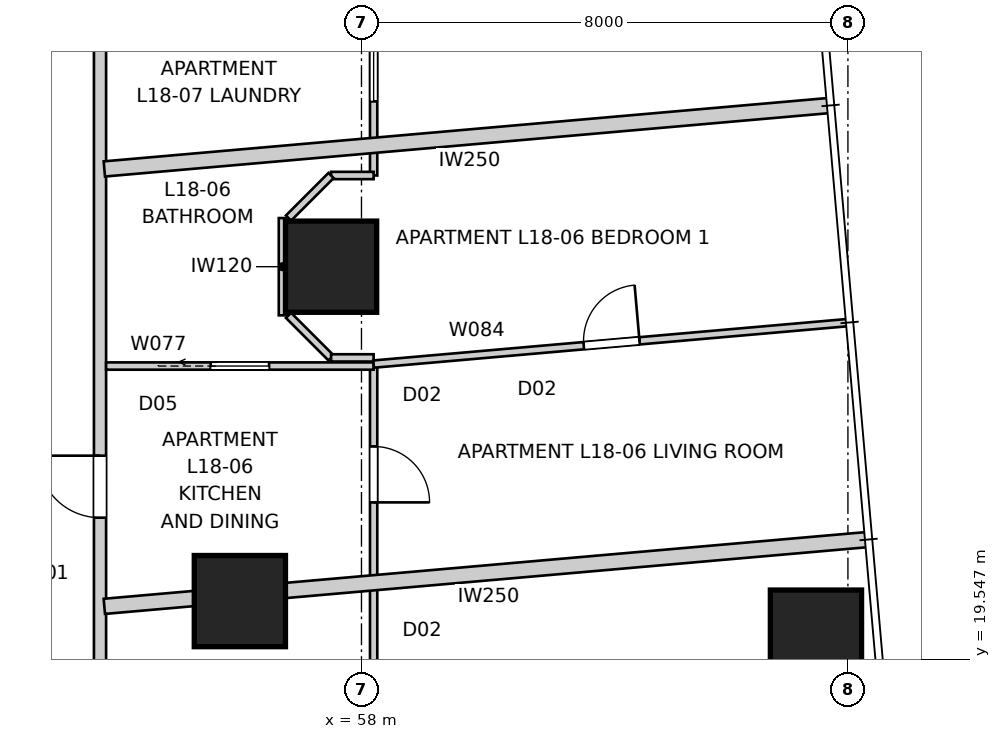
"""IFC4 building model, lengths in metres.
Left out: names, types, materials, properties, quantities, classifications, styles, units other than length and angle.
Written with IfcOpenShell. Run it as: python <this file> out.ifc"""

import sys

from ifc_helpers import new_model, si_unit, direction, frame, frame_2d, origin, origin_2d, place, context, subcontext, project, spatial, rectangle, extrude, element, fill, save


model = new_model("IFC4")
c1 = context("Model", 3, precision=1e-05, world=origin(), true_north=direction((0.0, 1.0)))
c2 = subcontext(c1, "Body", "Model", "MODEL_VIEW")
j1 = project(units=[si_unit("LENGTHUNIT", "METRE"), si_unit("PLANEANGLEUNIT", "RADIAN")], contexts=[c1])
p1 = place(None, origin())
s1 = spatial("IfcSite", under=j1, at=p1, CompositionType="ELEMENT")
p2 = place(p1, origin())
s2 = spatial("IfcBuilding", under=s1, at=p2, CompositionType="ELEMENT")
p3 = place(p2, frame((0.0, 0.0, 67.6)))
s3 = spatial("IfcBuildingStorey", under=s2, at=p3, CompositionType="ELEMENT", Elevation=67.6)
for number, where, z_axis, x_axis in (
    (1, (65.474, 19.932, 0.0), (0.0, 0.0, 1.0), (1.0, 0.0, 0.0)),
    (2, (57.5, 26.0, 0.0), (0.0, 0.0, 1.0), (1.0, 0.0, 0.0)),
    (3, (56.0, 20.5, 0.0), (0.0, 0.0, 1.0), (1.0, 0.0, 0.0)),
):
    element("IfcColumn", number, at=place(p3, frame(where, z_axis=z_axis, x_axis=x_axis)), inside=s3, PredefinedType="COLUMN", context=c2, shape_type="SweptSolid", body=[
        extrude(rectangle(XDim=1.5, YDim=1.5, at=origin_2d()), origin(), (0.0, 0.0, 1.0), 3.4),
    ])
p4 = place(p3, frame((53.7, 16.3, 0.0), z_axis=(0.0, 0.0, 1.0), x_axis=(0.0, 1.0, 0.0)))
e4 = element("IfcWall", 4, at=p4, inside=s3, PredefinedType="PARTITIONING", context=c2, shape_type="SweptSolid", body=[
    extrude(rectangle(XDim=28.2, YDim=0.2, at=frame_2d((14.1, 0.0))), origin(), (0.0, 0.0, 1.0), 3.25),
])
p5 = place(p4, frame((15.716, 0.0, 0.0)))
e5 = element("IfcOpeningElement", 5, at=p5, cuts=e4, PredefinedType="OPENING", context=c2, shape_type="SweptSolid", body=[
    extrude(rectangle(XDim=1.02, YDim=2.34, at=frame_2d((0.51, 1.17))), frame((0.0, 0.11, 0.0), z_axis=(0.0, -1.0, 0.0), x_axis=(1.0, 0.0, 0.0)), (0.0, 0.0, 1.0), 0.22),
])
p6 = place(p4, frame((5.572, 0.0, 0.0)))
e6 = element("IfcOpeningElement", 6, at=p6, cuts=e4, PredefinedType="OPENING", context=c2, shape_type="SweptSolid", body=[
    extrude(rectangle(XDim=1.02, YDim=2.34, at=frame_2d((0.51, 1.17))), frame((0.0, 0.11, 0.0), z_axis=(0.0, -1.0, 0.0), x_axis=(1.0, 0.0, 0.0)), (0.0, 0.0, 1.0), 0.22),
])
p7 = place(p4, frame((1.715, 0.0, 0.0)))
e7 = element("IfcOpeningElement", 7, at=p7, cuts=e4, PredefinedType="OPENING", context=c2, shape_type="SweptSolid", body=[
    extrude(rectangle(XDim=1.02, YDim=2.1, at=frame_2d((0.51, 1.05))), frame((0.0, 0.11, 0.0), z_axis=(0.0, -1.0, 0.0), x_axis=(1.0, 0.0, 0.0)), (0.0, 0.0, 1.0), 0.22),
])
p8 = place(p3, frame((65.715, 28.653, 0.0), z_axis=(0.0, 0.0, 1.0), x_axis=(-0.996195220272, -0.087149773992, 0.0)))
e8 = element("IfcWall", 8, at=p8, inside=s3, PredefinedType="PARTITIONING", context=c2, shape_type="SweptSolid", body=[
    extrude(rectangle(XDim=11.99, YDim=0.25, at=frame_2d((5.995, 0.0))), origin(), (0.0, 0.0, 1.0), 3.25),
])
p9 = place(p3, frame((66.34, 21.513, 0.0), z_axis=(0.0, 0.0, 1.0), x_axis=(-0.996194851608, -0.087153988028, 0.0)))
e9 = element("IfcWall", 9, at=p9, inside=s3, PredefinedType="PARTITIONING", context=c2, shape_type="SweptSolid", body=[
    extrude(rectangle(XDim=12.617, YDim=0.25, at=frame_2d((6.309, 0.0))), origin(), (0.0, 0.0, 1.0), 3.25),
])
p10 = place(p3, frame((58.2, 24.366, 0.0), z_axis=(0.0, 0.0, 1.0), x_axis=(0.0, -1.0, 0.0)))
e10 = element("IfcWall", 10, at=p10, inside=s3, PredefinedType="PARTITIONING", context=c2, shape_type="SweptSolid", body=[
    extrude(rectangle(XDim=12.566, YDim=0.12, at=frame_2d((6.283, 0.0))), origin(), (0.0, 0.0, 1.0), 3.25),
])
p11 = place(p10, frame((1.322, 0.0, 0.0)))
e11 = element("IfcOpeningElement", 11, at=p11, cuts=e10, PredefinedType="OPENING", context=c2, shape_type="SweptSolid", body=[
    extrude(rectangle(XDim=0.92, YDim=2.34, at=frame_2d((0.46, 1.17))), frame((0.0, 0.07, 0.0), z_axis=(0.0, -1.0, 0.0), x_axis=(1.0, 0.0, 0.0)), (0.0, 0.0, 1.0), 0.14),
])
p12 = place(p10, frame((5.188, 0.0, 0.0)))
e12 = element("IfcOpeningElement", 12, at=p12, cuts=e10, PredefinedType="OPENING", context=c2, shape_type="SweptSolid", body=[
    extrude(rectangle(XDim=0.92, YDim=2.34, at=frame_2d((0.46, 1.17))), frame((0.0, 0.07, 0.0), z_axis=(0.0, -1.0, 0.0), x_axis=(1.0, 0.0, 0.0)), (0.0, 0.0, 1.0), 0.14),
])
p13 = place(p3, frame((53.8, 24.366, 0.0), z_axis=(0.0, 0.0, 1.0), x_axis=(1.0, 0.0, 0.0)))
e13 = element("IfcWall", 13, at=p13, inside=s3, PredefinedType="PARTITIONING", context=c2, shape_type="SweptSolid", body=[
    extrude(rectangle(XDim=4.4, YDim=0.12, at=frame_2d((2.2, 0.0))), origin(), (0.0, 0.0, 1.0), 3.25),
])
p14 = place(p13, frame((1.72, 0.0, 0.0)))
e14 = element("IfcOpeningElement", 14, at=p14, cuts=e13, PredefinedType="OPENING", context=c2, shape_type="SweptSolid", body=[
    extrude(rectangle(XDim=0.96, YDim=2.1, at=frame_2d((0.48, 1.05))), frame((0.0, 0.07, 0.0), z_axis=(0.0, -1.0, 0.0), x_axis=(1.0, 0.0, 0.0)), (0.0, 0.0, 1.0), 0.14),
])
p15 = place(p3, frame((58.2, 48.2, 0.0), z_axis=(0.0, 0.0, 1.0), x_axis=(0.0, -1.0, 0.0)))
e15 = element("IfcWall", 15, at=p15, inside=s3, PredefinedType="PARTITIONING", context=c2, shape_type="SweptSolid", body=[
    extrude(rectangle(XDim=20.7, YDim=0.12, at=frame_2d((10.35, 0.0))), origin(), (0.0, 0.0, 1.0), 3.25),
])
p16 = place(p15, frame((15.095, 0.0, 0.0)))
e16 = element("IfcOpeningElement", 16, at=p16, cuts=e15, PredefinedType="OPENING", context=c2, shape_type="SweptSolid", body=[
    extrude(rectangle(XDim=0.92, YDim=2.34, at=frame_2d((0.46, 1.17))), frame((0.0, 0.07, 0.0), z_axis=(0.0, -1.0, 0.0), x_axis=(1.0, 0.0, 0.0)), (0.0, 0.0, 1.0), 0.14),
])
p17 = place(p15, frame((18.521, 0.0, 0.0)))
e17 = element("IfcOpeningElement", 17, at=p17, cuts=e15, PredefinedType="OPENING", context=c2, shape_type="SweptSolid", body=[
    extrude(rectangle(XDim=0.96, YDim=2.1, at=frame_2d((0.48, 1.05))), frame((0.0, 0.07, 0.0), z_axis=(0.0, -1.0, 0.0), x_axis=(1.0, 0.0, 0.0)), (0.0, 0.0, 1.0), 0.14),
])
p18 = place(p15, frame((0.675, 0.0, 0.0)))
e18 = element("IfcOpeningElement", 18, at=p18, cuts=e15, PredefinedType="OPENING", context=c2, shape_type="SweptSolid", body=[
    extrude(rectangle(XDim=0.92, YDim=2.34, at=frame_2d((0.46, 1.17))), frame((0.0, 0.07, 0.0), z_axis=(0.0, -1.0, 0.0), x_axis=(1.0, 0.0, 0.0)), (0.0, 0.0, 1.0), 0.14),
])
p19 = place(p15, frame((3.872, 0.0, 0.0)))
e19 = element("IfcOpeningElement", 19, at=p19, cuts=e15, PredefinedType="OPENING", context=c2, shape_type="SweptSolid", body=[
    extrude(rectangle(XDim=0.96, YDim=2.1, at=frame_2d((0.48, 1.05))), frame((0.0, 0.07, 0.0), z_axis=(0.0, -1.0, 0.0), x_axis=(1.0, 0.0, 0.0)), (0.0, 0.0, 1.0), 0.14),
])
p20 = place(p3, frame((58.2, 27.5, 0.0), z_axis=(0.0, 0.0, 1.0), x_axis=(-1.0, 0.0, 0.0)))
e20 = element("IfcWall", 20, at=p20, inside=s3, PredefinedType="PARTITIONING", context=c2, shape_type="SweptSolid", body=[
    extrude(rectangle(XDim=0.7, YDim=0.12, at=frame_2d((0.35, 0.0))), origin(), (0.0, 0.0, 1.0), 3.25),
])
p21 = place(p3, frame((57.5, 27.5, 0.0), z_axis=(0.0, 0.0, 1.0), x_axis=(-0.707106781187, -0.707106781187, 0.0)))
e21 = element("IfcWall", 21, at=p21, inside=s3, PredefinedType="PARTITIONING", context=c2, shape_type="SweptSolid", body=[
    extrude(rectangle(XDim=0.99, YDim=0.12, at=frame_2d((0.495, 0.0))), origin(), (0.0, 0.0, 1.0), 3.25),
])
p22 = place(p3, frame((56.7, 26.8, 0.0), z_axis=(0.0, 0.0, 1.0), x_axis=(0.0, -1.0, 0.0)))
e22 = element("IfcWall", 22, at=p22, inside=s3, PredefinedType="PARTITIONING", context=c2, shape_type="SweptSolid", body=[
    extrude(rectangle(XDim=1.6, YDim=0.12, at=frame_2d((0.8, 0.0))), origin(), (0.0, 0.0, 1.0), 3.25),
])
p23 = place(p3, frame((56.8, 25.2, 0.0), z_axis=(0.0, 0.0, 1.0), x_axis=(0.707106781187, -0.707106781187, 0.0)))
e23 = element("IfcWall", 23, at=p23, inside=s3, PredefinedType="PARTITIONING", context=c2, shape_type="SweptSolid", body=[
    extrude(rectangle(XDim=0.99, YDim=0.12, at=frame_2d((0.495, 0.0))), origin(), (0.0, 0.0, 1.0), 3.25),
])
p24 = place(p3, frame((57.5, 24.5, 0.0), z_axis=(0.0, 0.0, 1.0), x_axis=(1.0, 0.0, 0.0)))
e24 = element("IfcWall", 24, at=p24, inside=s3, PredefinedType="PARTITIONING", context=c2, shape_type="SweptSolid", body=[
    extrude(rectangle(XDim=0.7, YDim=0.12, at=frame_2d((0.35, 0.0))), origin(), (0.0, 0.0, 1.0), 3.25),
])
p25 = place(p3, frame((58.2, 24.398, 0.0), z_axis=(0.0, 0.0, 1.0), x_axis=(0.996194158156, 0.087161914023, 0.0)))
e25 = element("IfcWall", 25, at=p25, inside=s3, PredefinedType="PARTITIONING", context=c2, shape_type="SweptSolid", body=[
    extrude(rectangle(XDim=7.818, YDim=0.12, at=frame_2d((3.909, 0.0))), origin(), (0.0, 0.0, 1.0), 3.25),
])
p26 = place(p25, frame((3.469, 0.0, 0.0)))
e26 = element("IfcOpeningElement", 26, at=p26, cuts=e25, PredefinedType="OPENING", context=c2, shape_type="SweptSolid", body=[
    extrude(rectangle(XDim=0.92, YDim=2.34, at=frame_2d((0.46, 1.17))), frame((0.0, 0.07, 0.0), z_axis=(0.0, -1.0, 0.0), x_axis=(1.0, 0.0, 0.0)), (0.0, 0.0, 1.0), 0.14),
])
p27 = place(p6, origin())
e27 = element("IfcDoor", 27, at=p27, inside=s3, OperationType="SINGLE_SWING_RIGHT", PredefinedType="DOOR", context=c2, shape_type="SweptSolid", body=[
    extrude(rectangle(XDim=1.02, YDim=2.34, at=frame_2d((0.51, 1.17))), frame((0.0, 0.025, 0.0), z_axis=(0.0, -1.0, 0.0), x_axis=(1.0, 0.0, 0.0)), (0.0, 0.0, 1.0), 0.05),
])
fill(e6, e27)
p28 = place(p14, origin())
e28 = element("IfcDoor", 28, at=p28, inside=s3, OperationType="SLIDING_TO_LEFT", PredefinedType="DOOR", context=c2, shape_type="SweptSolid", body=[
    extrude(rectangle(XDim=0.96, YDim=2.1, at=frame_2d((0.48, 1.05))), frame((0.0, 0.025, 0.0), z_axis=(0.0, -1.0, 0.0), x_axis=(1.0, 0.0, 0.0)), (0.0, 0.0, 1.0), 0.05),
])
fill(e14, e28)
p29 = place(p11, origin())
e29 = element("IfcDoor", 29, at=p29, inside=s3, OperationType="SINGLE_SWING_RIGHT", PredefinedType="DOOR", context=c2, shape_type="SweptSolid", body=[
    extrude(rectangle(XDim=0.92, YDim=2.34, at=frame_2d((0.46, 1.17))), frame((0.0, 0.025, 0.0), z_axis=(0.0, -1.0, 0.0), x_axis=(1.0, 0.0, 0.0)), (0.0, 0.0, 1.0), 0.05),
])
fill(e11, e29)
p30 = place(p17, origin())
e30 = element("IfcDoor", 30, at=p30, inside=s3, OperationType="SLIDING_TO_LEFT", PredefinedType="DOOR", context=c2, shape_type="SweptSolid", body=[
    extrude(rectangle(XDim=0.96, YDim=2.1, at=frame_2d((0.48, 1.05))), frame((0.0, 0.025, 0.0), z_axis=(0.0, -1.0, 0.0), x_axis=(1.0, 0.0, 0.0)), (0.0, 0.0, 1.0), 0.05),
])
fill(e17, e30)
p31 = place(p26, origin())
e31 = element("IfcDoor", 31, at=p31, inside=s3, OperationType="SINGLE_SWING_RIGHT", PredefinedType="DOOR", context=c2, shape_type="SweptSolid", body=[
    extrude(rectangle(XDim=0.92, YDim=2.34, at=frame_2d((0.46, 1.17))), frame((0.0, 0.025, 0.0), z_axis=(0.0, -1.0, 0.0), x_axis=(1.0, 0.0, 0.0)), (0.0, 0.0, 1.0), 0.05),
])
fill(e26, e31)
save(model, sys.argv[1])
